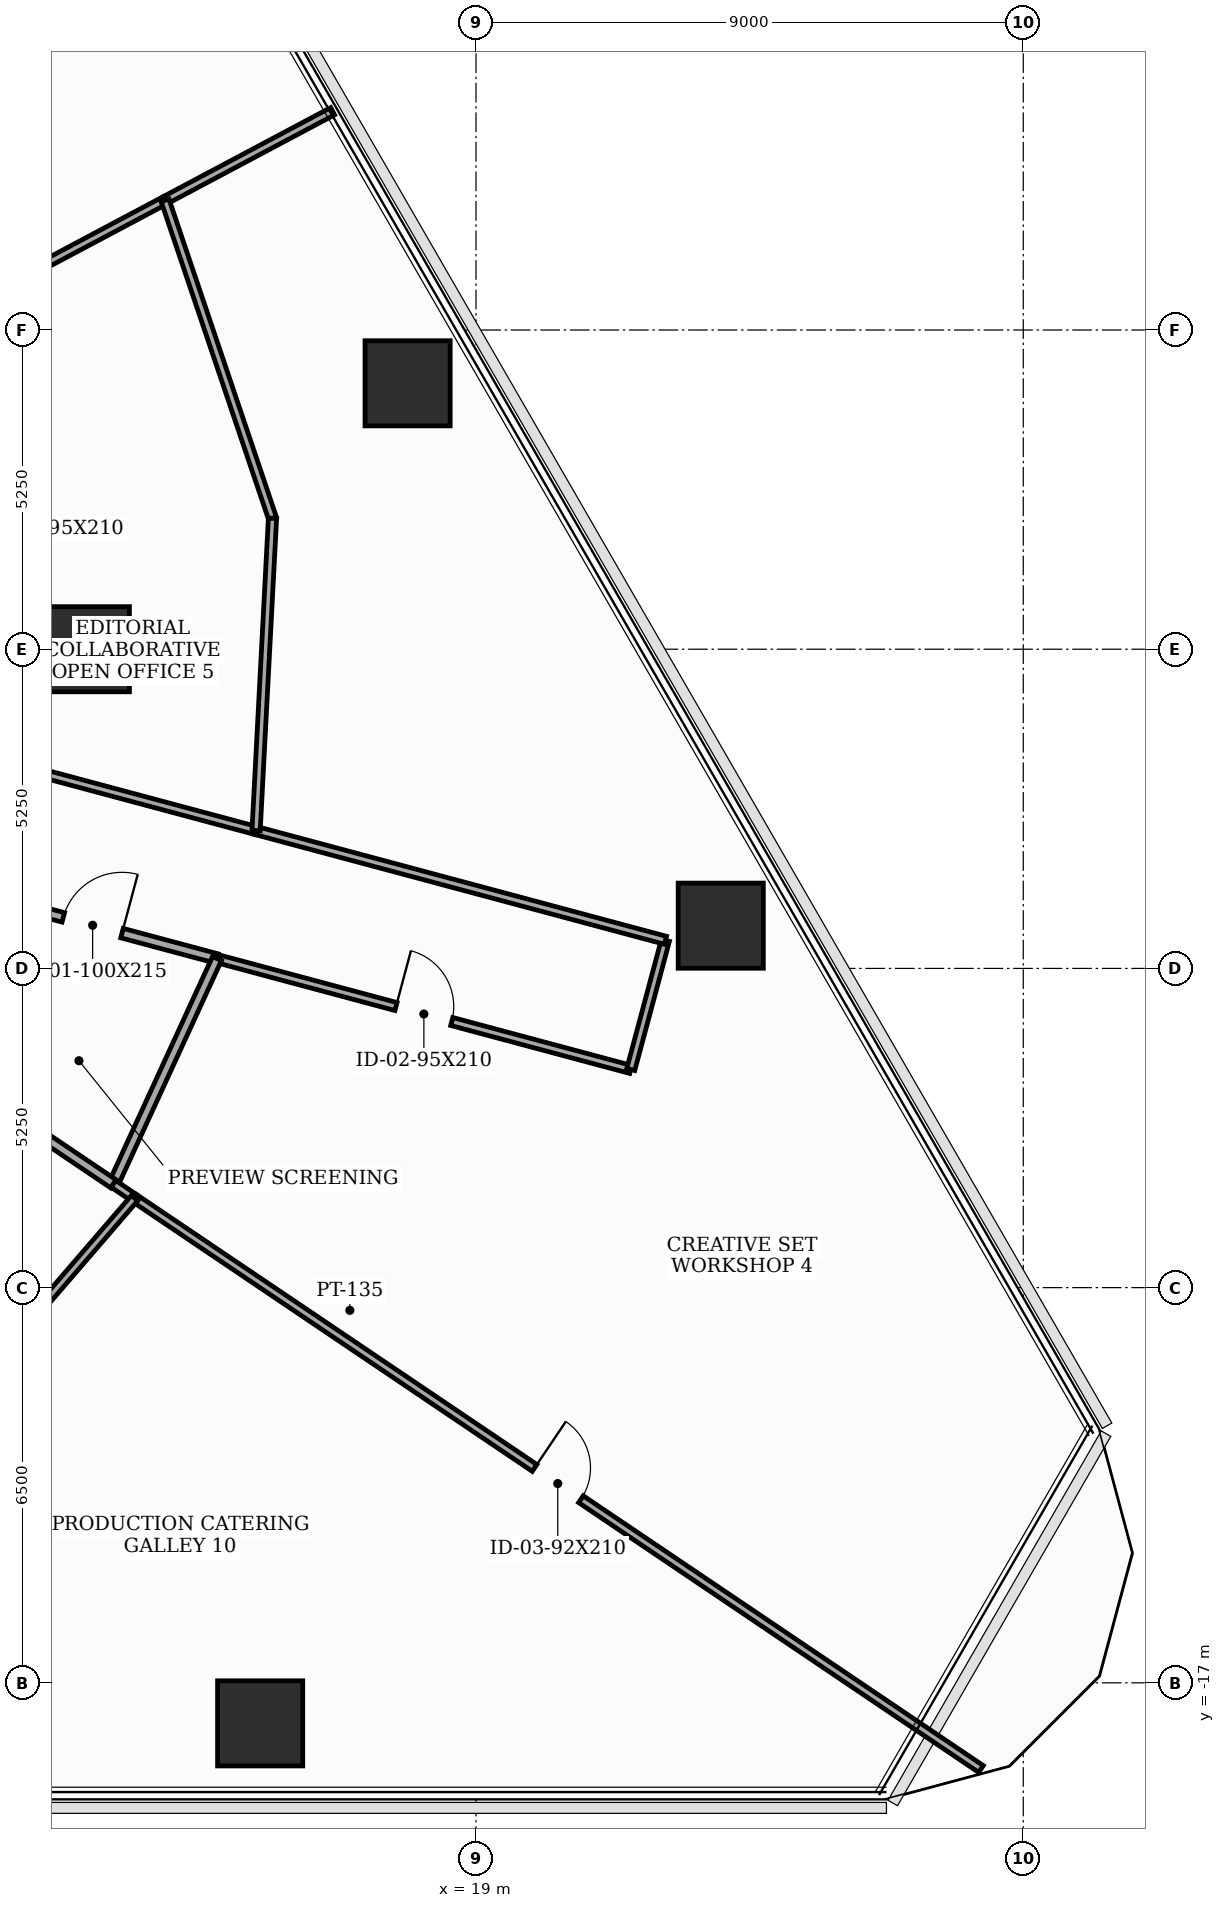
"""IFC4 building model, lengths in metres.
Left out: names, types, materials, properties, quantities, classifications, styles, units other than length and angle.
Written with IfcOpenShell. Run it as: python <this file> out.ifc"""

import sys

from ifc_helpers import new_model, si_unit, direction, frame, frame_2d, origin, origin_2d, place, context, subcontext, project, spatial, rectangle, extrude, element, fill, save


model = new_model("IFC4")
c1 = context("Model", 3, precision=1e-05, world=origin(), true_north=direction((0.0, 1.0)))
c2 = subcontext(c1, "Body", "Model", "MODEL_VIEW")
j1 = project(units=[si_unit("LENGTHUNIT", "METRE"), si_unit("PLANEANGLEUNIT", "RADIAN")], contexts=[c1])
p1 = place(None, origin())
s1 = spatial("IfcSite", under=j1, at=p1, CompositionType="ELEMENT")
p2 = place(p1, origin())
s2 = spatial("IfcBuilding", under=s1, at=p2, CompositionType="ELEMENT")
p3 = place(p2, frame((0.0, 0.0, 40.8)))
s3 = spatial("IfcBuildingStorey", under=s2, at=p3, CompositionType="ELEMENT", Elevation=40.8)
for number, where, z_axis, x_axis in (
    (1, (12.6, 0.0, 0.0), (0.0, 0.0, 1.0), (1.0, 0.0, 0.0)),
    (2, (15.45, -17.667, 0.0), (0.0, 0.0, 1.0), (1.0, 0.0, 0.0)),
    (3, (23.025, -4.547, 0.0), (0.0, 0.0, 1.0), (1.0, 0.0, 0.0)),
    (4, (17.875, 4.373, 0.0), (0.0, 0.0, 1.0), (1.0, 0.0, 0.0)),
):
    element("IfcColumn", number, at=place(p3, frame(where, z_axis=z_axis, x_axis=x_axis)), inside=s3, PredefinedType="COLUMN", context=c2, shape_type="SweptSolid", body=[
        extrude(rectangle(XDim=1.4, YDim=1.4, at=origin_2d()), origin(), (0.0, 0.0, 1.0), 3.7),
    ])
p4 = place(p3, frame((10.65, -3.992, 0.0), z_axis=(0.0, 0.0, 1.0), x_axis=(0.965925146235, -0.258821583086, 0.0)))
e5 = element("IfcWall", 5, at=p4, inside=s3, PredefinedType="PARTITIONING", context=c2, shape_type="SweptSolid", body=[
    extrude(rectangle(XDim=4.234, YDim=0.16, at=frame_2d((2.117, 0.0))), origin(), (0.0, 0.0, 1.0), 2.785),
])
p5 = place(p4, frame((1.617, 0.0, 0.0)))
e6 = element("IfcOpeningElement", 6, at=p5, cuts=e5, PredefinedType="OPENING", context=c2, shape_type="SweptSolid", body=[
    extrude(rectangle(XDim=1.0, YDim=2.15, at=frame_2d((0.5, 1.075))), frame((0.0, 0.09, 0.0), z_axis=(0.0, -1.0, 0.0), x_axis=(1.0, 0.0, 0.0)), (0.0, 0.0, 1.0), 0.18),
])
p6 = place(p3, frame((14.74, -5.088, 0.0), z_axis=(0.0, 0.0, 1.0), x_axis=(0.965895912523, -0.258930659002, 0.0)))
e7 = element("IfcWall", 7, at=p6, inside=s3, PredefinedType="PARTITIONING", context=c2, shape_type="SweptSolid", body=[
    extrude(rectangle(XDim=7.045, YDim=0.135, at=frame_2d((3.522, 0.0))), origin(), (0.0, 0.0, 1.0), 2.935),
])
p7 = place(p6, frame((3.048, 0.0, 0.0)))
e8 = element("IfcOpeningElement", 8, at=p7, cuts=e7, PredefinedType="OPENING", context=c2, shape_type="SweptSolid", body=[
    extrude(rectangle(XDim=0.95, YDim=2.1, at=frame_2d((0.475, 1.05))), frame((0.0, 0.077, 0.0), z_axis=(0.0, -1.0, 0.0), x_axis=(1.0, 0.0, 0.0)), (0.0, 0.0, 1.0), 0.155),
])
p8 = place(p3, frame((21.545, -6.912, 0.0), z_axis=(0.0, 0.0, 1.0), x_axis=(0.259105843213, 0.965848933329, 0.0)))
e9 = element("IfcWall", 9, at=p8, inside=s3, PredefinedType="PARTITIONING", context=c2, shape_type="SweptSolid", body=[
    extrude(rectangle(XDim=2.2, YDim=0.135, at=frame_2d((1.1, 0.0))), origin(), (0.0, 0.0, 1.0), 2.935),
])
p9 = place(p3, frame((22.115, -4.787, 0.0), z_axis=(0.0, 0.0, 1.0), x_axis=(-0.965912084765, 0.258870323726, 0.0)))
e10 = element("IfcWall", 10, at=p9, inside=s3, PredefinedType="PARTITIONING", context=c2, shape_type="SweptSolid", body=[
    extrude(rectangle(XDim=6.969, YDim=0.135, at=frame_2d((3.485, 0.0))), origin(), (0.0, 0.0, 1.0), 3.085),
])
p10 = place(p3, frame((15.383, -2.983, 0.0), z_axis=(0.0, 0.0, 1.0), x_axis=(-0.965947384406, 0.258738575706, 0.0)))
e11 = element("IfcWall", 11, at=p10, inside=s3, PredefinedType="PARTITIONING", context=c2, shape_type="SweptSolid", body=[
    extrude(rectangle(XDim=4.9, YDim=0.135, at=frame_2d((2.45, 0.0))), origin(), (0.0, 0.0, 1.0), 2.785),
])
p11 = place(p3, frame((13.886, 7.383, 0.0), z_axis=(0.0, 0.0, 1.0), x_axis=(0.88293033741, 0.469504014126, 0.0)))
e12 = element("IfcWall", 12, at=p11, inside=s3, PredefinedType="PARTITIONING", context=c2, shape_type="SweptSolid", body=[
    extrude(rectangle(XDim=3.122, YDim=0.135, at=frame_2d((1.561, 0.0))), origin(), (0.0, 0.0, 1.0), 2.935),
])
p12 = place(p3, frame((10.65, 5.663, 0.0), z_axis=(0.0, 0.0, 1.0), x_axis=(0.88302513666, 0.469325695041, 0.0)))
e13 = element("IfcWall", 13, at=p12, inside=s3, PredefinedType="PARTITIONING", context=c2, shape_type="SweptSolid", body=[
    extrude(rectangle(XDim=3.665, YDim=0.135, at=frame_2d((1.833, 0.0))), origin(), (0.0, 0.0, 1.0), 2.785),
])
p13 = place(p3, frame((13.038, -8.794, 0.0), z_axis=(0.0, 0.0, 1.0), x_axis=(0.417322480709, 0.908758464662, 0.0)))
e14 = element("IfcWall", 14, at=p13, inside=s3, PredefinedType="PARTITIONING", context=c2, shape_type="SweptSolid", body=[
    extrude(rectangle(XDim=4.078, YDim=0.16, at=frame_2d((2.039, 0.0))), origin(), (0.0, 0.0, 1.0), 3.5),
])
p14 = place(p3, frame((10.65, -7.184, 0.0), z_axis=(0.0, 0.0, 1.0), x_axis=(0.829196392101, -0.558957371654, 0.0)))
e15 = element("IfcWall", 15, at=p14, inside=s3, PredefinedType="PARTITIONING", context=c2, shape_type="SweptSolid", body=[
    extrude(rectangle(XDim=2.88, YDim=0.16, at=frame_2d((1.44, 0.0))), origin(), (0.0, 0.0, 1.0), 3.5),
])
p15 = place(p3, frame((13.886, 7.383, 0.0), z_axis=(0.0, 0.0, 1.0), x_axis=(0.320099223205, -0.947384023141, 0.0)))
e16 = element("IfcWall", 16, at=p15, inside=s3, PredefinedType="PARTITIONING", context=c2, shape_type="SweptSolid", body=[
    extrude(rectangle(XDim=5.521, YDim=0.135, at=frame_2d((2.76, 0.0))), origin(), (0.0, 0.0, 1.0), 2.685),
])
p16 = place(p3, frame((15.653, 2.153, 0.0), z_axis=(0.0, 0.0, 1.0), x_axis=(-0.05250152841, -0.998620843721, 0.0)))
e17 = element("IfcWall", 17, at=p16, inside=s3, PredefinedType="PARTITIONING", context=c2, shape_type="SweptSolid", body=[
    extrude(rectangle(XDim=5.143, YDim=0.135, at=frame_2d((2.572, 0.0))), origin(), (0.0, 0.0, 1.0), 2.685),
])
p17 = place(p3, frame((13.038, -8.794, 0.0), z_axis=(0.0, 0.0, 1.0), x_axis=(0.828163729679, -0.560486250361, 0.0)))
e18 = element("IfcWall", 18, at=p17, inside=s3, PredefinedType="PARTITIONING", context=c2, shape_type="SweptSolid", body=[
    extrude(rectangle(XDim=0.418, YDim=0.135, at=frame_2d((0.209, 0.0))), origin(), (0.0, 0.0, 1.0), 3.5),
])
p18 = place(p3, frame((13.384, -9.028, 0.0), z_axis=(0.0, 0.0, 1.0), x_axis=(0.829042972493, -0.55918489765, 0.0)))
e19 = element("IfcWall", 19, at=p18, inside=s3, PredefinedType="PARTITIONING", context=c2, shape_type="SweptSolid", body=[
    extrude(rectangle(XDim=16.791, YDim=0.135, at=frame_2d((8.396, 0.0))), origin(), (0.0, 0.0, 1.0), 2.935),
])
p19 = place(p18, frame((7.936, 0.0, 0.0)))
e20 = element("IfcOpeningElement", 20, at=p19, cuts=e19, PredefinedType="OPENING", context=c2, shape_type="SweptSolid", body=[
    extrude(rectangle(XDim=0.92, YDim=2.1, at=frame_2d((0.46, 1.05))), frame((0.0, 0.077, 0.0), z_axis=(0.0, -1.0, 0.0), x_axis=(1.0, 0.0, 0.0)), (0.0, 0.0, 1.0), 0.155),
])
p20 = place(p3, frame((10.628, -12.226, 0.0), z_axis=(0.0, 0.0, 1.0), x_axis=(0.652832083446, 0.757502654004, 0.0)))
e21 = element("IfcWall", 21, at=p20, inside=s3, PredefinedType="PARTITIONING", context=c2, shape_type="SweptSolid", body=[
    extrude(rectangle(XDim=4.222, YDim=0.135, at=frame_2d((2.111, 0.0))), origin(), (0.0, 0.0, 1.0), 3.5),
])
p21 = place(p5, origin())
e22 = element("IfcDoor", 22, at=p21, inside=s3, OperationType="SINGLE_SWING_RIGHT", PredefinedType="DOOR", context=c2, shape_type="SweptSolid", body=[
    extrude(rectangle(XDim=1.0, YDim=2.15, at=frame_2d((0.5, 1.075))), frame((0.0, 0.025, 0.0), z_axis=(0.0, -1.0, 0.0), x_axis=(1.0, 0.0, 0.0)), (0.0, 0.0, 1.0), 0.05),
])
fill(e6, e22)
p22 = place(p7, origin())
e23 = element("IfcDoor", 23, at=p22, inside=s3, OperationType="SINGLE_SWING_LEFT", PredefinedType="DOOR", context=c2, shape_type="SweptSolid", body=[
    extrude(rectangle(XDim=0.95, YDim=2.1, at=frame_2d((0.475, 1.05))), frame((0.0, 0.025, 0.0), z_axis=(0.0, -1.0, 0.0), x_axis=(1.0, 0.0, 0.0)), (0.0, 0.0, 1.0), 0.05),
])
fill(e8, e23)
p23 = place(p19, origin())
e24 = element("IfcDoor", 24, at=p23, inside=s3, OperationType="SINGLE_SWING_LEFT", PredefinedType="DOOR", context=c2, shape_type="SweptSolid", body=[
    extrude(rectangle(XDim=0.92, YDim=2.1, at=frame_2d((0.46, 1.05))), frame((0.0, 0.025, 0.0), z_axis=(0.0, -1.0, 0.0), x_axis=(1.0, 0.0, 0.0)), (0.0, 0.0, 1.0), 0.05),
])
fill(e20, e24)
save(model, sys.argv[1])
